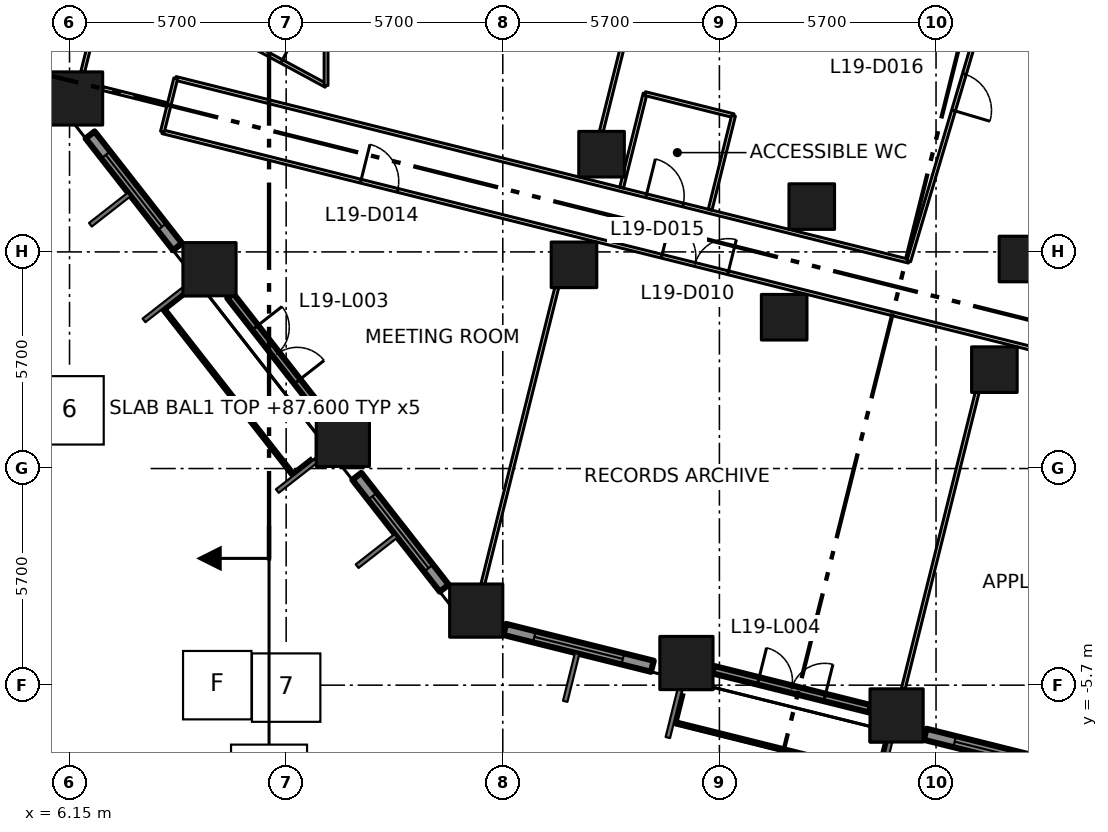
"""IFC4 building model, lengths in metres.
Left out: names, types, materials, properties, quantities, classifications, styles, units other than length and angle.
Written with IfcOpenShell. Run it as: python <this file> out.ifc"""

import sys

from ifc_helpers import new_model, si_unit, direction, frame, frame_2d, origin, origin_2d, place, context, subcontext, project, spatial, rectangle, extrude, element, fill, save


model = new_model("IFC4")
c1 = context("Model", 3, precision=1e-05, world=origin(), true_north=direction((0.0, 1.0)))
c2 = subcontext(c1, "Body", "Model", "MODEL_VIEW")
j1 = project(units=[si_unit("LENGTHUNIT", "METRE"), si_unit("PLANEANGLEUNIT", "RADIAN")], contexts=[c1])
p1 = place(None, origin())
s1 = spatial("IfcSite", under=j1, at=p1, CompositionType="ELEMENT")
p2 = place(p1, origin())
s2 = spatial("IfcBuilding", under=s1, at=p2, CompositionType="ELEMENT")
p3 = place(p2, frame((0.0, 0.0, 87.6)))
s3 = spatial("IfcBuildingStorey", under=s2, at=p3, CompositionType="ELEMENT", Elevation=87.6)
for number, where, z_axis, x_axis in (
    (1, (16.851, -3.738, 0.0), (0.0, 0.0, 1.0), (1.0, 0.0, 0.0)),
    (2, (13.342, 0.754, 0.0), (0.0, 0.0, 1.0), (1.0, 0.0, 0.0)),
    (3, (9.833, 5.245, 0.0), (0.0, 0.0, 1.0), (1.0, 0.0, 0.0)),
    (4, (6.323, 9.737, 0.0), (0.0, 0.0, 1.0), (1.0, 0.0, 0.0)),
    (5, (22.382, -5.117, 0.0), (0.0, 0.0, 1.0), (1.0, 0.0, 0.0)),
    (6, (27.912, -6.496, 0.0), (0.0, 0.0, 1.0), (1.0, 0.0, 0.0)),
):
    element("IfcColumn", number, at=place(p3, frame(where, z_axis=z_axis, x_axis=x_axis)), inside=s3, PredefinedType="COLUMN", context=c2, shape_type="SweptSolid", body=[
        extrude(rectangle(XDim=1.4, YDim=1.4, at=origin_2d()), origin(), (0.0, 0.0, 1.0), 4.2),
    ])
for number, where, z_axis, x_axis in (
    (7, (19.424, 5.36, 0.0), (0.0, 0.0, 1.0), (1.0, 0.0, 0.0)),
    (8, (24.954, 3.981, 0.0), (0.0, 0.0, 1.0), (1.0, 0.0, 0.0)),
    (9, (30.485, 2.602, 0.0), (0.0, 0.0, 1.0), (1.0, 0.0, 0.0)),
    (10, (20.149, 8.271, 0.0), (0.0, 0.0, 1.0), (1.0, 0.0, 0.0)),
    (11, (25.68, 6.892, 0.0), (0.0, 0.0, 1.0), (1.0, 0.0, 0.0)),
    (12, (31.211, 5.513, 0.0), (0.0, 0.0, 1.0), (1.0, 0.0, 0.0)),
):
    element("IfcColumn", number, at=place(p3, frame(where, z_axis=z_axis, x_axis=x_axis)), inside=s3, PredefinedType="COLUMN", context=c2, shape_type="SweptSolid", body=[
        extrude(rectangle(XDim=1.2, YDim=1.2, at=origin_2d()), origin(), (0.0, 0.0, 1.0), 4.2),
    ])
p4 = place(p3, frame((6.692, 8.778, 0.0), z_axis=(0.0, 0.0, 1.0), x_axis=(0.615767067156, -0.787928244833, 0.0)))
e13 = element("IfcWall", 13, at=p4, inside=s3, PredefinedType="SOLIDWALL", context=c2, shape_type="SweptSolid", body=[
    extrude(rectangle(XDim=3.735, YDim=0.3, at=frame_2d((1.868, 0.0))), origin(), (0.0, 0.0, 1.0), 2.95),
])
p5 = place(p4, frame((0.668, 0.0, 0.8)))
e14 = element("IfcOpeningElement", 14, at=p5, cuts=e13, PredefinedType="OPENING", context=c2, shape_type="SweptSolid", body=[
    extrude(rectangle(XDim=2.4, YDim=1.45, at=frame_2d((1.2, 0.725))), frame((0.0, 0.16, 0.0), z_axis=(0.0, -1.0, 0.0), x_axis=(1.0, 0.0, 0.0)), (0.0, 0.0, 1.0), 0.32),
])
p6 = place(p3, frame((10.38, 4.545, 0.0), z_axis=(0.0, 0.0, 1.0), x_axis=(0.615697185896, -0.787982852148, 0.0)))
e15 = element("IfcWall", 15, at=p6, inside=s3, PredefinedType="SOLIDWALL", context=c2, shape_type="SweptSolid", body=[
    extrude(rectangle(XDim=3.922, YDim=0.2, at=frame_2d((1.961, 0.0))), origin(), (0.0, 0.0, 1.0), 2.95),
])
p7 = place(p6, frame((1.061, 0.0, 0.0)))
e16 = element("IfcOpeningElement", 16, at=p7, cuts=e15, PredefinedType="OPENING", context=c2, shape_type="SweptSolid", body=[
    extrude(rectangle(XDim=1.8, YDim=2.9, at=frame_2d((0.9, 1.45))), frame((0.0, 0.11, 0.0), z_axis=(0.0, -1.0, 0.0), x_axis=(1.0, 0.0, 0.0)), (0.0, 0.0, 1.0), 0.22),
])
p8 = place(p3, frame((8.89, 4.292, 0.0), z_axis=(0.0, 0.0, 1.0), x_axis=(0.615636085037, -0.788030590016, 0.0)))
e17 = element("IfcWall", 17, at=p8, inside=s3, PredefinedType="SOLIDWALL", context=c2, shape_type="SweptSolid", body=[
    extrude(rectangle(XDim=5.359, YDim=0.4, at=frame_2d((2.679, 0.0))), origin(), (0.0, 0.0, 1.0), 0.3),
])
p9 = place(p3, frame((13.71, -0.205, 0.0), z_axis=(0.0, 0.0, 1.0), x_axis=(0.615798780214, -0.787903460004, 0.0)))
e18 = element("IfcWall", 18, at=p9, inside=s3, PredefinedType="SOLIDWALL", context=c2, shape_type="SweptSolid", body=[
    extrude(rectangle(XDim=3.735, YDim=0.3, at=frame_2d((1.868, 0.0))), origin(), (0.0, 0.0, 1.0), 2.95),
])
p10 = place(p9, frame((0.667, 0.0, 0.8)))
e19 = element("IfcOpeningElement", 19, at=p10, cuts=e18, PredefinedType="OPENING", context=c2, shape_type="SweptSolid", body=[
    extrude(rectangle(XDim=2.4, YDim=1.45, at=frame_2d((1.2, 0.725))), frame((0.0, 0.16, 0.0), z_axis=(0.0, -1.0, 0.0), x_axis=(1.0, 0.0, 0.0)), (0.0, 0.0, 1.0), 0.32),
])
p11 = place(p3, frame((17.602, -4.234, 0.0), z_axis=(0.0, 0.0, 1.0), x_axis=(0.970260773365, -0.242062040951, 0.0)))
e20 = element("IfcWall", 20, at=p11, inside=s3, PredefinedType="SOLIDWALL", context=c2, shape_type="SweptSolid", body=[
    extrude(rectangle(XDim=4.003, YDim=0.3, at=frame_2d((2.001, 0.0))), origin(), (0.0, 0.0, 1.0), 2.95),
])
p12 = place(p11, frame((0.802, 0.0, 0.8)))
e21 = element("IfcOpeningElement", 21, at=p12, cuts=e20, PredefinedType="OPENING", context=c2, shape_type="SweptSolid", body=[
    extrude(rectangle(XDim=2.4, YDim=1.45, at=frame_2d((1.2, 0.725))), frame((0.0, 0.16, 0.0), z_axis=(0.0, -1.0, 0.0), x_axis=(1.0, 0.0, 0.0)), (0.0, 0.0, 1.0), 0.32),
])
p13 = place(p3, frame((23.082, -5.291, 0.0), z_axis=(0.0, 0.0, 1.0), x_axis=(0.970277311249, -0.241995742265, 0.0)))
e22 = element("IfcWall", 22, at=p13, inside=s3, PredefinedType="SOLIDWALL", context=c2, shape_type="SweptSolid", body=[
    extrude(rectangle(XDim=4.256, YDim=0.2, at=frame_2d((2.128, 0.0))), origin(), (0.0, 0.0, 1.0), 2.95),
])
p14 = place(p13, frame((1.228, 0.0, 0.0)))
e23 = element("IfcOpeningElement", 23, at=p14, cuts=e22, PredefinedType="OPENING", context=c2, shape_type="SweptSolid", body=[
    extrude(rectangle(XDim=1.8, YDim=2.9, at=frame_2d((0.9, 1.45))), frame((0.0, 0.11, 0.0), z_axis=(0.0, -1.0, 0.0), x_axis=(1.0, 0.0, 0.0)), (0.0, 0.0, 1.0), 0.22),
])
p15 = place(p3, frame((22.225, -6.448, 0.0), z_axis=(0.0, 0.0, 1.0), x_axis=(0.970268314528, -0.242031811592, 0.0)))
e24 = element("IfcWall", 24, at=p15, inside=s3, PredefinedType="SOLIDWALL", context=c2, shape_type="SweptSolid", body=[
    extrude(rectangle(XDim=5.359, YDim=0.4, at=frame_2d((2.68, 0.0))), origin(), (0.0, 0.0, 1.0), 0.3),
])
p16 = place(p3, frame((28.663, -6.992, 0.0), z_axis=(0.0, 0.0, 1.0), x_axis=(0.970318045095, -0.24183236211, 0.0)))
e25 = element("IfcWall", 25, at=p16, inside=s3, PredefinedType="SOLIDWALL", context=c2, shape_type="SweptSolid", body=[
    extrude(rectangle(XDim=4.003, YDim=0.3, at=frame_2d((2.001, 0.0))), origin(), (0.0, 0.0, 1.0), 2.95),
])
p17 = place(p16, frame((0.802, 0.0, 0.8)))
e26 = element("IfcOpeningElement", 26, at=p17, cuts=e25, PredefinedType="OPENING", context=c2, shape_type="SweptSolid", body=[
    extrude(rectangle(XDim=2.4, YDim=1.45, at=frame_2d((1.2, 0.725))), frame((0.0, 0.16, 0.0), z_axis=(0.0, -1.0, 0.0), x_axis=(1.0, 0.0, 0.0)), (0.0, 0.0, 1.0), 0.32),
])
p18 = place(p3, frame((8.594, 8.862, 0.0), z_axis=(0.0, 0.0, 1.0), x_axis=(0.970293746648, -0.241929835316, 0.0)))
e27 = element("IfcWall", 27, at=p18, inside=s3, PredefinedType="PARTITIONING", context=c2, shape_type="SweptSolid", body=[
    extrude(rectangle(XDim=68.375, YDim=0.1, at=frame_2d((34.188, 0.0))), origin(), (0.0, 0.0, 1.0), 3.75),
])
p19 = place(p18, frame((40.94, 0.0, 0.0)))
e28 = element("IfcOpeningElement", 28, at=p19, cuts=e27, PredefinedType="OPENING", context=c2, shape_type="SweptSolid", body=[
    extrude(rectangle(XDim=1.8, YDim=2.1, at=frame_2d((0.9, 1.05))), frame((0.0, 0.06, 0.0), z_axis=(0.0, -1.0, 0.0), x_axis=(1.0, 0.0, 0.0)), (0.0, 0.0, 1.0), 0.12),
])
p20 = place(p18, frame((47.941, 0.0, 0.0)))
e29 = element("IfcOpeningElement", 29, at=p20, cuts=e27, PredefinedType="OPENING", context=c2, shape_type="SweptSolid", body=[
    extrude(rectangle(XDim=1.8, YDim=2.1, at=frame_2d((0.9, 1.05))), frame((0.0, 0.06, 0.0), z_axis=(0.0, -1.0, 0.0), x_axis=(1.0, 0.0, 0.0)), (0.0, 0.0, 1.0), 0.12),
])
p21 = place(p18, frame((58.94, 0.0, 0.0)))
e30 = element("IfcOpeningElement", 30, at=p21, cuts=e27, PredefinedType="OPENING", context=c2, shape_type="SweptSolid", body=[
    extrude(rectangle(XDim=1.0, YDim=2.1, at=frame_2d((0.5, 1.05))), frame((0.0, 0.06, 0.0), z_axis=(0.0, -1.0, 0.0), x_axis=(1.0, 0.0, 0.0)), (0.0, 0.0, 1.0), 0.12),
])
p22 = place(p18, frame((13.54, 0.0, 0.0)))
e31 = element("IfcOpeningElement", 31, at=p22, cuts=e27, PredefinedType="OPENING", context=c2, shape_type="SweptSolid", body=[
    extrude(rectangle(XDim=1.8, YDim=2.1, at=frame_2d((0.9, 1.05))), frame((0.0, 0.06, 0.0), z_axis=(0.0, -1.0, 0.0), x_axis=(1.0, 0.0, 0.0)), (0.0, 0.0, 1.0), 0.12),
])
p23 = place(p18, frame((25.24, 0.0, 0.0)))
e32 = element("IfcOpeningElement", 32, at=p23, cuts=e27, PredefinedType="OPENING", context=c2, shape_type="SweptSolid", body=[
    extrude(rectangle(XDim=1.8, YDim=2.1, at=frame_2d((0.9, 1.05))), frame((0.0, 0.06, 0.0), z_axis=(0.0, -1.0, 0.0), x_axis=(1.0, 0.0, 0.0)), (0.0, 0.0, 1.0), 0.12),
])
p24 = place(p18, frame((5.38, 0.0, 0.0)))
e33 = element("IfcOpeningElement", 33, at=p24, cuts=e27, PredefinedType="OPENING", context=c2, shape_type="SweptSolid", body=[
    extrude(rectangle(XDim=1.0, YDim=2.1, at=frame_2d((0.5, 1.05))), frame((0.0, 0.06, 0.0), z_axis=(0.0, -1.0, 0.0), x_axis=(1.0, 0.0, 0.0)), (0.0, 0.0, 1.0), 0.12),
])
p25 = place(p3, frame((8.944, 10.264, 0.0), z_axis=(0.0, 0.0, 1.0), x_axis=(0.970300504447, -0.241902730595, 0.0)))
e34 = element("IfcWall", 34, at=p25, inside=s3, PredefinedType="PARTITIONING", context=c2, shape_type="SweptSolid", body=[
    extrude(rectangle(XDim=19.879, YDim=0.1, at=frame_2d((9.939, 0.0))), origin(), (0.0, 0.0, 1.0), 3.75),
])
p26 = place(p25, frame((12.759, 0.0, 0.0)))
e35 = element("IfcOpeningElement", 35, at=p26, cuts=e34, PredefinedType="OPENING", context=c2, shape_type="SweptSolid", body=[
    extrude(rectangle(XDim=1.0, YDim=2.1, at=frame_2d((0.5, 1.05))), frame((0.0, 0.06, 0.0), z_axis=(0.0, -1.0, 0.0), x_axis=(1.0, 0.0, 0.0)), (0.0, 0.0, 1.0), 0.12),
])
p27 = place(p3, frame((8.944, 10.264, 0.0), z_axis=(0.0, 0.0, 1.0), x_axis=(-0.242297077633, -0.970202105837, 0.0)))
e36 = element("IfcWall", 36, at=p27, inside=s3, PredefinedType="PARTITIONING", context=c2, shape_type="SweptSolid", body=[
    extrude(rectangle(XDim=1.445, YDim=0.1, at=frame_2d((0.722, 0.0))), origin(), (0.0, 0.0, 1.0), 3.75),
])
p28 = place(p3, frame((9.9, 11.7, 0.0), z_axis=(0.0, 0.0, 1.0), x_axis=(0.87965147249, -0.475618846291, 0.0)))
e37 = element("IfcWall", 37, at=p28, inside=s3, PredefinedType="PARTITIONING", context=c2, shape_type="SweptSolid", body=[
    extrude(rectangle(XDim=3.41, YDim=0.1, at=frame_2d((1.705, 0.0))), origin(), (0.0, 0.0, 1.0), 3.75),
])
p29 = place(p28, frame((1.08, 0.0, 0.0)))
e38 = element("IfcOpeningElement", 38, at=p29, cuts=e37, PredefinedType="OPENING", context=c2, shape_type="SweptSolid", body=[
    extrude(rectangle(XDim=1.0, YDim=2.1, at=frame_2d((0.5, 1.05))), frame((0.0, 0.06, 0.0), z_axis=(0.0, -1.0, 0.0), x_axis=(1.0, 0.0, 0.0)), (0.0, 0.0, 1.0), 0.12),
])
p30 = place(p3, frame((12.9, 10.078, 0.0), z_axis=(0.0, 0.0, 1.0), x_axis=(0.0, 1.0, 0.0)))
e39 = element("IfcWall", 39, at=p30, inside=s3, PredefinedType="PARTITIONING", context=c2, shape_type="SweptSolid", body=[
    extrude(rectangle(XDim=4.022, YDim=0.1, at=frame_2d((2.011, 0.0))), origin(), (0.0, 0.0, 1.0), 3.75),
])
p31 = place(p3, frame((30.8, 14.1, 0.0), z_axis=(0.0, 0.0, 1.0), x_axis=(-0.284664373847, -0.95862724469, 0.0)))
e40 = element("IfcWall", 40, at=p31, inside=s3, PredefinedType="PARTITIONING", context=c2, shape_type="SweptSolid", body=[
    extrude(rectangle(XDim=9.018, YDim=0.1, at=frame_2d((4.509, 0.0))), origin(), (0.0, 0.0, 1.0), 3.75),
])
p32 = place(p31, frame((3.88, 0.0, 0.0)))
e41 = element("IfcOpeningElement", 41, at=p32, cuts=e40, PredefinedType="OPENING", context=c2, shape_type="SweptSolid", body=[
    extrude(rectangle(XDim=1.0, YDim=2.1, at=frame_2d((0.5, 1.05))), frame((0.0, 0.06, 0.0), z_axis=(0.0, -1.0, 0.0), x_axis=(1.0, 0.0, 0.0)), (0.0, 0.0, 1.0), 0.12),
])
p33 = place(p3, frame((6.797, 11.638, 0.0), z_axis=(0.0, 0.0, 1.0), x_axis=(-0.242396400943, -0.970177295555, 0.0)))
e42 = element("IfcWall", 42, at=p33, inside=s3, PredefinedType="PARTITIONING", context=c2, shape_type="SweptSolid", body=[
    extrude(rectangle(XDim=1.238, YDim=0.1, at=frame_2d((0.619, 0.0))), origin(), (0.0, 0.0, 1.0), 3.75),
])
p34 = place(p3, frame((8.72, 9.574, 0.0), z_axis=(0.0, 0.0, 1.0), x_axis=(-0.97016712555, 0.242437102155, 0.0)))
e43 = element("IfcWall", 43, at=p34, inside=s3, PredefinedType="PARTITIONING", context=c2, shape_type="SweptSolid", body=[
    extrude(rectangle(XDim=1.749, YDim=0.1, at=frame_2d((0.875, 0.0))), origin(), (0.0, 0.0, 1.0), 3.75),
])
p35 = place(p3, frame((17.026, -3.038, 0.0), z_axis=(0.0, 0.0, 1.0), x_axis=(0.241899423388, 0.970301328951, 0.0)))
e44 = element("IfcWall", 44, at=p35, inside=s3, PredefinedType="PARTITIONING", context=c2, shape_type="SweptSolid", body=[
    extrude(rectangle(XDim=8.037, YDim=0.1, at=frame_2d((4.019, 0.0))), origin(), (0.0, 0.0, 1.0), 3.75),
])
p36 = place(p3, frame((20.143, 8.871, 0.0), z_axis=(0.0, 0.0, 1.0), x_axis=(0.241959975721, 0.970286231042, 0.0)))
e45 = element("IfcWall", 45, at=p36, inside=s3, PredefinedType="PARTITIONING", context=c2, shape_type="SweptSolid", body=[
    extrude(rectangle(XDim=5.389, YDim=0.1, at=frame_2d((2.695, 0.0))), origin(), (0.0, 0.0, 1.0), 3.75),
])
p37 = place(p3, frame((20.677, 7.391, 0.0), z_axis=(0.0, 0.0, 1.0), x_axis=(0.241972320765, 0.970283152478, 0.0)))
e46 = element("IfcWall", 46, at=p37, inside=s3, PredefinedType="PARTITIONING", context=c2, shape_type="SweptSolid", body=[
    extrude(rectangle(XDim=2.55, YDim=0.1, at=frame_2d((1.275, 0.0))), origin(), (0.0, 0.0, 1.0), 3.75),
])
p38 = place(p3, frame((21.294, 9.865, 0.0), z_axis=(0.0, 0.0, 1.0), x_axis=(0.970238184317, -0.242152566975, 0.0)))
e47 = element("IfcWall", 47, at=p38, inside=s3, PredefinedType="PARTITIONING", context=c2, shape_type="SweptSolid", body=[
    extrude(rectangle(XDim=2.4, YDim=0.1, at=frame_2d((1.2, 0.0))), origin(), (0.0, 0.0, 1.0), 3.75),
])
p39 = place(p3, frame((23.622, 9.284, 0.0), z_axis=(0.0, 0.0, 1.0), x_axis=(-0.241611677547, -0.970373019654, 0.0)))
e48 = element("IfcWall", 48, at=p39, inside=s3, PredefinedType="PARTITIONING", context=c2, shape_type="SweptSolid", body=[
    extrude(rectangle(XDim=2.549, YDim=0.1, at=frame_2d((1.275, 0.0))), origin(), (0.0, 0.0, 1.0), 3.75),
])
p40 = place(p3, frame((28.088, -5.796, 0.0), z_axis=(0.0, 0.0, 1.0), x_axis=(0.241906553757, 0.970299551298, 0.0)))
e49 = element("IfcWall", 49, at=p40, inside=s3, PredefinedType="PARTITIONING", context=c2, shape_type="SweptSolid", body=[
    extrude(rectangle(XDim=8.037, YDim=0.1, at=frame_2d((4.018, 0.0))), origin(), (0.0, 0.0, 1.0), 3.75),
])
p41 = place(p5, origin())
e50 = element("IfcWindow", 50, at=p41, inside=s3, PartitioningType="DOUBLE_PANEL_VERTICAL", PredefinedType="WINDOW", context=c2, shape_type="SweptSolid", body=[
    extrude(rectangle(XDim=2.4, YDim=1.45, at=frame_2d((1.2, 0.725))), frame((0.0, 0.03, 0.0), z_axis=(0.0, -1.0, 0.0), x_axis=(1.0, 0.0, 0.0)), (0.0, 0.0, 1.0), 0.06),
])
fill(e14, e50)
p42 = place(p7, origin())
e51 = element("IfcDoor", 51, at=p42, inside=s3, OperationType="DOUBLE_DOOR_SINGLE_SWING", PredefinedType="DOOR", context=c2, shape_type="SweptSolid", body=[
    extrude(rectangle(XDim=1.8, YDim=2.9, at=frame_2d((0.9, 1.45))), frame((0.0, 0.025, 0.0), z_axis=(0.0, -1.0, 0.0), x_axis=(1.0, 0.0, 0.0)), (0.0, 0.0, 1.0), 0.05),
])
fill(e16, e51)
p43 = place(p10, origin())
e52 = element("IfcWindow", 52, at=p43, inside=s3, PartitioningType="DOUBLE_PANEL_VERTICAL", PredefinedType="WINDOW", context=c2, shape_type="SweptSolid", body=[
    extrude(rectangle(XDim=2.4, YDim=1.45, at=frame_2d((1.2, 0.725))), frame((0.0, 0.03, 0.0), z_axis=(0.0, -1.0, 0.0), x_axis=(1.0, 0.0, 0.0)), (0.0, 0.0, 1.0), 0.06),
])
fill(e19, e52)
p44 = place(p12, origin())
e53 = element("IfcWindow", 53, at=p44, inside=s3, PartitioningType="DOUBLE_PANEL_VERTICAL", PredefinedType="WINDOW", context=c2, shape_type="SweptSolid", body=[
    extrude(rectangle(XDim=2.4, YDim=1.45, at=frame_2d((1.2, 0.725))), frame((0.0, 0.03, 0.0), z_axis=(0.0, -1.0, 0.0), x_axis=(1.0, 0.0, 0.0)), (0.0, 0.0, 1.0), 0.06),
])
fill(e21, e53)
p45 = place(p14, origin())
e54 = element("IfcDoor", 54, at=p45, inside=s3, OperationType="DOUBLE_DOOR_SINGLE_SWING", PredefinedType="DOOR", context=c2, shape_type="SweptSolid", body=[
    extrude(rectangle(XDim=1.8, YDim=2.9, at=frame_2d((0.9, 1.45))), frame((0.0, 0.025, 0.0), z_axis=(0.0, -1.0, 0.0), x_axis=(1.0, 0.0, 0.0)), (0.0, 0.0, 1.0), 0.05),
])
fill(e23, e54)
p46 = place(p17, origin())
e55 = element("IfcWindow", 55, at=p46, inside=s3, PartitioningType="DOUBLE_PANEL_VERTICAL", PredefinedType="WINDOW", context=c2, shape_type="SweptSolid", body=[
    extrude(rectangle(XDim=2.4, YDim=1.45, at=frame_2d((1.2, 0.725))), frame((0.0, 0.03, 0.0), z_axis=(0.0, -1.0, 0.0), x_axis=(1.0, 0.0, 0.0)), (0.0, 0.0, 1.0), 0.06),
])
fill(e26, e55)
p47 = place(p22, origin())
e56 = element("IfcDoor", 56, at=p47, inside=s3, OperationType="DOUBLE_DOOR_SINGLE_SWING", PredefinedType="DOOR", context=c2, shape_type="SweptSolid", body=[
    extrude(rectangle(XDim=1.8, YDim=2.1, at=frame_2d((0.9, 1.05))), frame((0.0, 0.025, 0.0), z_axis=(0.0, -1.0, 0.0), x_axis=(1.0, 0.0, 0.0)), (0.0, 0.0, 1.0), 0.05),
])
fill(e31, e56)
p48 = place(p29, origin())
e57 = element("IfcDoor", 57, at=p48, inside=s3, OperationType="SINGLE_SWING_RIGHT", PredefinedType="DOOR", context=c2, shape_type="SweptSolid", body=[
    extrude(rectangle(XDim=1.0, YDim=2.1, at=frame_2d((0.5, 1.05))), frame((0.0, 0.025, 0.0), z_axis=(0.0, -1.0, 0.0), x_axis=(1.0, 0.0, 0.0)), (0.0, 0.0, 1.0), 0.05),
])
fill(e38, e57)
p49 = place(p24, origin())
e58 = element("IfcDoor", 58, at=p49, inside=s3, OperationType="SINGLE_SWING_LEFT", PredefinedType="DOOR", context=c2, shape_type="SweptSolid", body=[
    extrude(rectangle(XDim=1.0, YDim=2.1, at=frame_2d((0.5, 1.05))), frame((0.0, 0.025, 0.0), z_axis=(0.0, -1.0, 0.0), x_axis=(1.0, 0.0, 0.0)), (0.0, 0.0, 1.0), 0.05),
])
fill(e33, e58)
p50 = place(p26, origin())
e59 = element("IfcDoor", 59, at=p50, inside=s3, OperationType="SINGLE_SWING_LEFT", PredefinedType="DOOR", context=c2, shape_type="SweptSolid", body=[
    extrude(rectangle(XDim=1.0, YDim=2.1, at=frame_2d((0.5, 1.05))), frame((0.0, 0.025, 0.0), z_axis=(0.0, -1.0, 0.0), x_axis=(1.0, 0.0, 0.0)), (0.0, 0.0, 1.0), 0.05),
])
fill(e35, e59)
p51 = place(p32, origin())
e60 = element("IfcDoor", 60, at=p51, inside=s3, OperationType="SINGLE_SWING_RIGHT", PredefinedType="DOOR", context=c2, shape_type="SweptSolid", body=[
    extrude(rectangle(XDim=1.0, YDim=2.1, at=frame_2d((0.5, 1.05))), frame((0.0, 0.025, 0.0), z_axis=(0.0, -1.0, 0.0), x_axis=(1.0, 0.0, 0.0)), (0.0, 0.0, 1.0), 0.05),
])
fill(e41, e60)
save(model, sys.argv[1])
